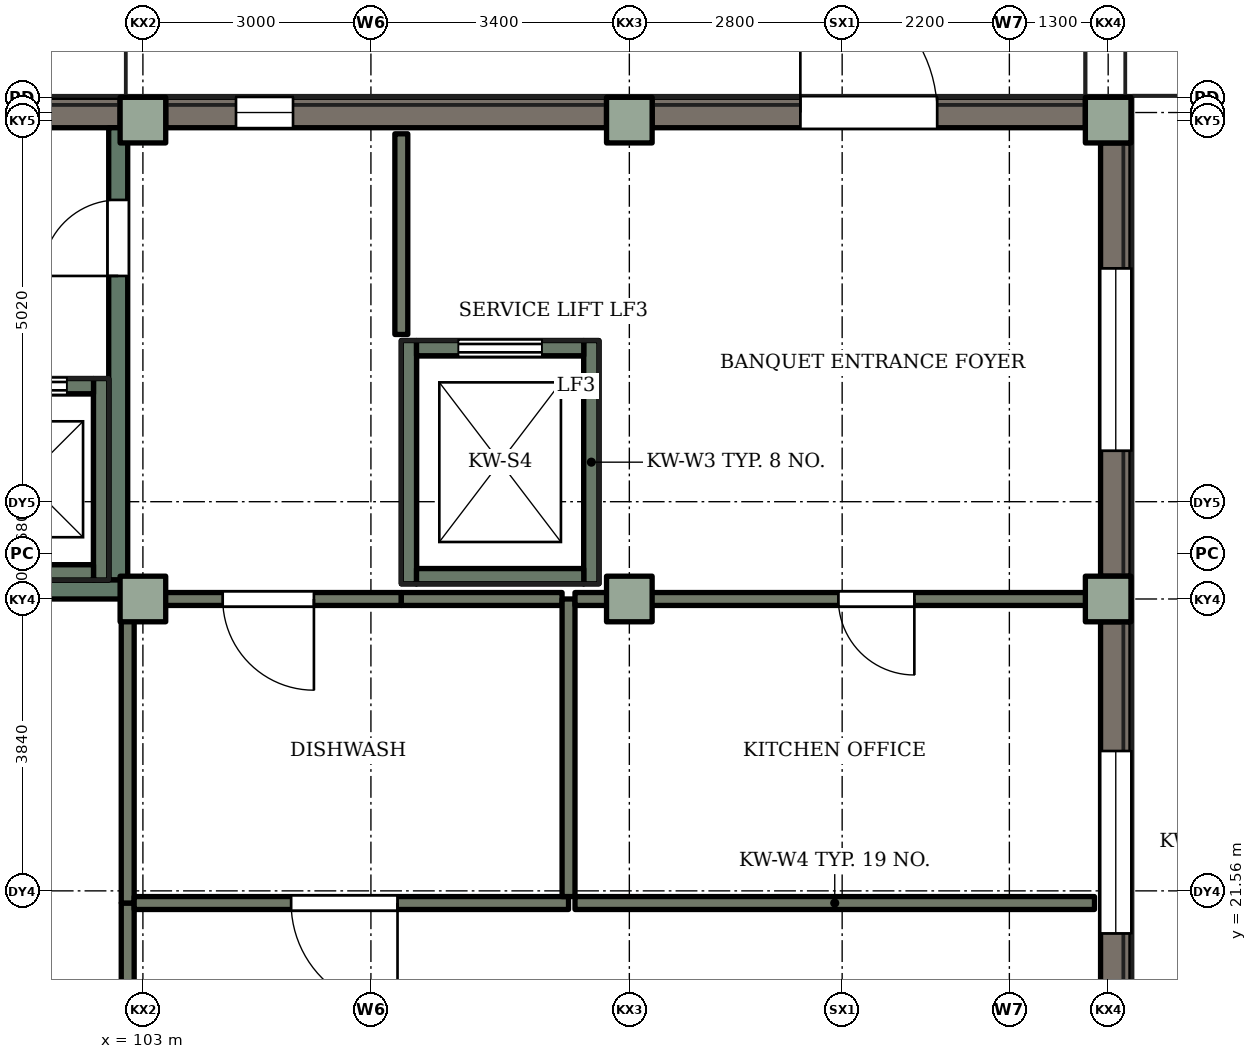
"""IFC4 building model, lengths in metres.
Left out: names, types, materials, properties, quantities, classifications, styles, units other than length and angle.
Written with IfcOpenShell. Run it as: python <this file> out.ifc"""

import sys

from ifc_helpers import new_model, si_unit, direction, frame, frame_2d, origin, origin_2d, place, context, subcontext, project, spatial, rectangle, extrude, element, fill, save


model = new_model("IFC4")
c1 = context("Model", 3, precision=1e-05, world=origin(), true_north=direction((0.0, 1.0)))
c2 = subcontext(c1, "Body", "Model", "MODEL_VIEW")
j1 = project(units=[si_unit("LENGTHUNIT", "METRE"), si_unit("PLANEANGLEUNIT", "RADIAN")], contexts=[c1])
p1 = place(None, origin())
s1 = spatial("IfcSite", under=j1, at=p1, CompositionType="ELEMENT")
p2 = place(p1, origin())
s2 = spatial("IfcBuilding", under=s1, at=p2, CompositionType="ELEMENT")
p3 = place(p2, origin())
s3 = spatial("IfcBuildingStorey", under=s2, at=p3, CompositionType="ELEMENT", Elevation=0.0)
for number, where, z_axis, x_axis in (
    (1, (103.0, 25.4, 0.0), (0.0, 0.0, 1.0), (1.0, 0.0, 0.0)),
    (2, (103.0, 31.7, 0.0), (0.0, 0.0, 1.0), (1.0, 0.0, 0.0)),
    (3, (109.4, 25.4, 0.0), (0.0, 0.0, 1.0), (1.0, 0.0, 0.0)),
    (4, (109.4, 31.7, 0.0), (0.0, 0.0, 1.0), (1.0, 0.0, 0.0)),
    (5, (115.7, 25.4, 0.0), (0.0, 0.0, 1.0), (1.0, 0.0, 0.0)),
    (6, (115.7, 31.7, 0.0), (0.0, 0.0, 1.0), (1.0, 0.0, 0.0)),
):
    element("IfcColumn", number, at=place(p3, frame(where, z_axis=z_axis, x_axis=x_axis)), inside=s3, PredefinedType="COLUMN", context=c2, shape_type="SweptSolid", body=[
        extrude(rectangle(XDim=0.6, YDim=0.6, at=origin_2d()), origin(), (0.0, 0.0, 1.0), 4.2),
    ])
p4 = place(p3, frame((97.0, 31.8, 0.0), z_axis=(0.0, 0.0, 1.0), x_axis=(1.0, 0.0, 0.0)))
e7 = element("IfcWall", 7, at=p4, inside=s3, PredefinedType="SOLIDWALL", context=c2, shape_type="SweptSolid", body=[
    extrude(rectangle(XDim=5.7, YDim=0.4, at=frame_2d((2.85, 0.0))), origin(), (0.0, 0.0, 1.0), 4.2),
])
p5 = place(p4, frame((1.5, 0.0, 0.0)))
e8 = element("IfcOpeningElement", 8, at=p5, cuts=e7, PredefinedType="OPENING", context=c2, shape_type="SweptSolid", body=[
    extrude(rectangle(XDim=1.0, YDim=2.4, at=frame_2d((0.5, 1.2))), frame((0.0, 0.21, 0.0), z_axis=(0.0, -1.0, 0.0), x_axis=(1.0, 0.0, 0.0)), (0.0, 0.0, 1.0), 0.42),
])
p6 = place(p3, frame((103.3, 31.8, 0.0), z_axis=(0.0, 0.0, 1.0), x_axis=(1.0, 0.0, 0.0)))
e9 = element("IfcWall", 9, at=p6, inside=s3, PredefinedType="SOLIDWALL", context=c2, shape_type="SweptSolid", body=[
    extrude(rectangle(XDim=5.8, YDim=0.4, at=frame_2d((2.9, 0.0))), origin(), (0.0, 0.0, 1.0), 4.2),
])
p7 = place(p6, frame((0.925, 0.0, 1.5)))
e10 = element("IfcOpeningElement", 10, at=p7, cuts=e9, PredefinedType="OPENING", context=c2, shape_type="SweptSolid", body=[
    extrude(rectangle(XDim=0.75, YDim=1.2, at=frame_2d((0.375, 0.6))), frame((0.0, 0.21, 0.0), z_axis=(0.0, -1.0, 0.0), x_axis=(1.0, 0.0, 0.0)), (0.0, 0.0, 1.0), 0.42),
])
p8 = place(p3, frame((109.7, 31.8, 0.0), z_axis=(0.0, 0.0, 1.0), x_axis=(1.0, 0.0, 0.0)))
e11 = element("IfcWall", 11, at=p8, inside=s3, PredefinedType="SOLIDWALL", context=c2, shape_type="SweptSolid", body=[
    extrude(rectangle(XDim=5.7, YDim=0.4, at=frame_2d((2.85, 0.0))), origin(), (0.0, 0.0, 1.0), 4.2),
])
p9 = place(p8, frame((1.95, 0.0, 0.0)))
e12 = element("IfcOpeningElement", 12, at=p9, cuts=e11, PredefinedType="OPENING", context=c2, shape_type="SweptSolid", body=[
    extrude(rectangle(XDim=1.8, YDim=2.4, at=frame_2d((0.9, 1.2))), frame((0.0, 0.21, 0.0), z_axis=(0.0, -1.0, 0.0), x_axis=(1.0, 0.0, 0.0)), (0.0, 0.0, 1.0), 0.42),
])
p10 = place(p3, frame((115.8, 25.1, 0.0), z_axis=(0.0, 0.0, 1.0), x_axis=(0.0, -1.0, 0.0)))
e13 = element("IfcWall", 13, at=p10, inside=s3, PredefinedType="SOLIDWALL", context=c2, shape_type="SweptSolid", body=[
    extrude(rectangle(XDim=5.8, YDim=0.4, at=frame_2d((2.9, 0.0))), origin(), (0.0, 0.0, 1.0), 4.2),
])
p11 = place(p10, frame((1.7, 0.0, 1.5)))
e14 = element("IfcOpeningElement", 14, at=p11, cuts=e13, PredefinedType="OPENING", context=c2, shape_type="SweptSolid", body=[
    extrude(rectangle(XDim=2.4, YDim=1.2, at=frame_2d((1.2, 0.6))), frame((0.0, 0.21, 0.0), z_axis=(0.0, -1.0, 0.0), x_axis=(1.0, 0.0, 0.0)), (0.0, 0.0, 1.0), 0.42),
])
p12 = place(p3, frame((115.8, 31.4, 0.0), z_axis=(0.0, 0.0, 1.0), x_axis=(0.0, -1.0, 0.0)))
e15 = element("IfcWall", 15, at=p12, inside=s3, PredefinedType="SOLIDWALL", context=c2, shape_type="SweptSolid", body=[
    extrude(rectangle(XDim=5.7, YDim=0.4, at=frame_2d((2.85, 0.0))), origin(), (0.0, 0.0, 1.0), 4.2),
])
p13 = place(p12, frame((1.65, 0.0, 1.0)))
e16 = element("IfcOpeningElement", 16, at=p13, cuts=e15, PredefinedType="OPENING", context=c2, shape_type="SweptSolid", body=[
    extrude(rectangle(XDim=2.4, YDim=1.8, at=frame_2d((1.2, 0.9))), frame((0.0, 0.21, 0.0), z_axis=(0.0, -1.0, 0.0), x_axis=(1.0, 0.0, 0.0)), (0.0, 0.0, 1.0), 0.42),
])
p14 = place(p3, frame((102.675, 25.65, 0.0), z_axis=(0.0, 0.0, 1.0), x_axis=(0.0, 1.0, 0.0)))
e17 = element("IfcWall", 17, at=p14, inside=s3, PredefinedType="SHEAR", context=c2, shape_type="SweptSolid", body=[
    extrude(rectangle(XDim=5.95, YDim=0.25, at=frame_2d((2.975, 0.0))), origin(), (0.0, 0.0, 1.0), 4.2),
])
p15 = place(p14, frame((4.0, 0.0, 0.0)))
e18 = element("IfcOpeningElement", 18, at=p15, cuts=e17, PredefinedType="OPENING", context=c2, shape_type="SweptSolid", body=[
    extrude(rectangle(XDim=1.0, YDim=2.1, at=frame_2d((0.5, 1.05))), frame((0.0, 0.135, 0.0), z_axis=(0.0, -1.0, 0.0), x_axis=(1.0, 0.0, 0.0)), (0.0, 0.0, 1.0), 0.27),
])
p16 = place(p3, frame((96.8, 25.525, 0.0), z_axis=(0.0, 0.0, 1.0), x_axis=(1.0, 0.0, 0.0)))
e19 = element("IfcWall", 19, at=p16, inside=s3, PredefinedType="SHEAR", context=c2, shape_type="SweptSolid", body=[
    extrude(rectangle(XDim=6.0, YDim=0.25, at=frame_2d((3.0, 0.0))), origin(), (0.0, 0.0, 1.0), 4.2),
])
p17 = place(p3, frame((102.45, 25.65, 0.0), z_axis=(0.0, 0.0, 1.0), x_axis=(0.0, 1.0, 0.0)))
e20 = element("IfcWall", 20, at=p17, inside=s3, PredefinedType="SHEAR", context=c2, shape_type="SweptSolid", body=[
    extrude(rectangle(XDim=2.65, YDim=0.2, at=frame_2d((1.325, 0.0))), origin(), (0.0, 0.0, 1.0), 4.2),
])
p18 = place(p3, frame((100.55, 25.75, 0.0), z_axis=(0.0, 0.0, 1.0), x_axis=(1.0, 0.0, 0.0)))
e21 = element("IfcWall", 21, at=p18, inside=s3, PredefinedType="SHEAR", context=c2, shape_type="SweptSolid", body=[
    extrude(rectangle(XDim=1.8, YDim=0.2, at=frame_2d((0.9, 0.0))), origin(), (0.0, 0.0, 1.0), 4.2),
])
p19 = place(p3, frame((100.55, 28.2, 0.0), z_axis=(0.0, 0.0, 1.0), x_axis=(1.0, 0.0, 0.0)))
e22 = element("IfcWall", 22, at=p19, inside=s3, PredefinedType="SHEAR", context=c2, shape_type="SweptSolid", body=[
    extrude(rectangle(XDim=1.8, YDim=0.2, at=frame_2d((0.9, 0.0))), origin(), (0.0, 0.0, 1.0), 4.2),
])
p20 = place(p19, frame((0.35, 0.0, 0.0)))
e23 = element("IfcOpeningElement", 23, at=p20, cuts=e22, PredefinedType="OPENING", context=c2, shape_type="SweptSolid", body=[
    extrude(rectangle(XDim=1.1, YDim=2.1, at=frame_2d((0.55, 1.05))), frame((0.0, 0.11, 0.0), z_axis=(0.0, -1.0, 0.0), x_axis=(1.0, 0.0, 0.0)), (0.0, 0.0, 1.0), 0.22),
])
for number, where, z_axis, x_axis in (
    (24, (106.5, 25.6, 0.0), (0.0, 0.0, 1.0), (0.0, 1.0, 0.0)),
    (25, (108.9, 25.6, 0.0), (0.0, 0.0, 1.0), (0.0, 1.0, 0.0)),
):
    element("IfcWall", number, at=place(p3, frame(where, z_axis=z_axis, x_axis=x_axis)), inside=s3, PredefinedType="SHEAR", context=c2, shape_type="SweptSolid", body=[
        extrude(rectangle(XDim=3.2, YDim=0.2, at=frame_2d((1.6, 0.0))), origin(), (0.0, 0.0, 1.0), 4.2),
    ])
p21 = place(p3, frame((106.6, 25.7, 0.0), z_axis=(0.0, 0.0, 1.0), x_axis=(1.0, 0.0, 0.0)))
e26 = element("IfcWall", 26, at=p21, inside=s3, PredefinedType="SHEAR", context=c2, shape_type="SweptSolid", body=[
    extrude(rectangle(XDim=2.2, YDim=0.2, at=frame_2d((1.1, 0.0))), origin(), (0.0, 0.0, 1.0), 4.2),
])
p22 = place(p3, frame((106.6, 28.7, 0.0), z_axis=(0.0, 0.0, 1.0), x_axis=(1.0, 0.0, 0.0)))
e27 = element("IfcWall", 27, at=p22, inside=s3, PredefinedType="SHEAR", context=c2, shape_type="SweptSolid", body=[
    extrude(rectangle(XDim=2.2, YDim=0.2, at=frame_2d((1.1, 0.0))), origin(), (0.0, 0.0, 1.0), 4.2),
])
p23 = place(p22, frame((0.55, 0.0, 0.0)))
e28 = element("IfcOpeningElement", 28, at=p23, cuts=e27, PredefinedType="OPENING", context=c2, shape_type="SweptSolid", body=[
    extrude(rectangle(XDim=1.1, YDim=2.1, at=frame_2d((0.55, 1.05))), frame((0.0, 0.11, 0.0), z_axis=(0.0, -1.0, 0.0), x_axis=(1.0, 0.0, 0.0)), (0.0, 0.0, 1.0), 0.22),
])
p24 = place(p3, frame((102.45, 25.65, -1.4), z_axis=(0.0, 0.0, 1.0), x_axis=(0.0, 1.0, 0.0)))
e29 = element("IfcWall", 29, at=p24, inside=s3, PredefinedType="SHEAR", context=c2, shape_type="SweptSolid", body=[
    extrude(rectangle(XDim=2.65, YDim=0.2, at=frame_2d((1.325, 0.0))), origin(), (0.0, 0.0, 1.0), 1.4),
])
for number, where, z_axis, x_axis in (
    (30, (100.55, 25.75, -1.4), (0.0, 0.0, 1.0), (1.0, 0.0, 0.0)),
    (31, (100.55, 28.2, -1.4), (0.0, 0.0, 1.0), (1.0, 0.0, 0.0)),
):
    element("IfcWall", number, at=place(p3, frame(where, z_axis=z_axis, x_axis=x_axis)), inside=s3, PredefinedType="SHEAR", context=c2, shape_type="SweptSolid", body=[
        extrude(rectangle(XDim=1.8, YDim=0.2, at=frame_2d((0.9, 0.0))), origin(), (0.0, 0.0, 1.0), 1.4),
    ])
for number, where, z_axis, x_axis in (
    (32, (106.5, 25.6, -1.4), (0.0, 0.0, 1.0), (0.0, 1.0, 0.0)),
    (33, (108.9, 25.6, -1.4), (0.0, 0.0, 1.0), (0.0, 1.0, 0.0)),
):
    element("IfcWall", number, at=place(p3, frame(where, z_axis=z_axis, x_axis=x_axis)), inside=s3, PredefinedType="SHEAR", context=c2, shape_type="SweptSolid", body=[
        extrude(rectangle(XDim=3.2, YDim=0.2, at=frame_2d((1.6, 0.0))), origin(), (0.0, 0.0, 1.0), 1.4),
    ])
for number, where, z_axis, x_axis in (
    (34, (106.6, 25.7, -1.4), (0.0, 0.0, 1.0), (1.0, 0.0, 0.0)),
    (35, (106.6, 28.7, -1.4), (0.0, 0.0, 1.0), (1.0, 0.0, 0.0)),
):
    element("IfcWall", number, at=place(p3, frame(where, z_axis=z_axis, x_axis=x_axis)), inside=s3, PredefinedType="SHEAR", context=c2, shape_type="SweptSolid", body=[
        extrude(rectangle(XDim=2.2, YDim=0.2, at=frame_2d((1.1, 0.0))), origin(), (0.0, 0.0, 1.0), 1.4),
    ])
p25 = place(p3, frame((102.8, 12.485, 0.0), z_axis=(0.0, 0.0, 1.0), x_axis=(0.0, 1.0, 0.0)))
e36 = element("IfcWall", 36, at=p25, inside=s3, PredefinedType="PARTITIONING", context=c2, shape_type="SweptSolid", body=[
    extrude(rectangle(XDim=8.915, YDim=0.17, at=frame_2d((4.458, 0.0))), origin(), (0.0, 0.0, 1.0), 3.92),
])
p26 = place(p25, frame((3.865, 0.0, 0.0)))
e37 = element("IfcOpeningElement", 37, at=p26, cuts=e36, PredefinedType="OPENING", context=c2, shape_type="SweptSolid", body=[
    extrude(rectangle(XDim=1.2, YDim=2.1, at=frame_2d((0.6, 1.05))), frame((0.0, 0.095, 0.0), z_axis=(0.0, -1.0, 0.0), x_axis=(1.0, 0.0, 0.0)), (0.0, 0.0, 1.0), 0.19),
])
p27 = place(p3, frame((102.8, 21.4, 0.0), z_axis=(0.0, 0.0, 1.0), x_axis=(0.0, 1.0, 0.0)))
e38 = element("IfcWall", 38, at=p27, inside=s3, PredefinedType="PARTITIONING", context=c2, shape_type="SweptSolid", body=[
    extrude(rectangle(XDim=3.92, YDim=0.17, at=frame_2d((1.96, 0.0))), origin(), (0.0, 0.0, 1.0), 3.92),
])
p28 = place(p3, frame((103.22, 31.6, 0.0), z_axis=(0.0, 0.0, 1.0), x_axis=(-1.0, 0.0, 0.0)))
e39 = element("IfcWall", 39, at=p28, inside=s3, PredefinedType="PARTITIONING", context=c2, shape_type="SweptSolid", body=[
    extrude(rectangle(XDim=0.34, YDim=0.17, at=frame_2d((0.17, 0.0))), origin(), (0.0, 0.0, 1.0), 3.92),
])
p29 = place(p3, frame((106.4, 25.4, 0.0), z_axis=(0.0, 0.0, 1.0), x_axis=(-1.0, 0.0, 0.0)))
e40 = element("IfcWall", 40, at=p29, inside=s3, PredefinedType="PARTITIONING", context=c2, shape_type="SweptSolid", body=[
    extrude(rectangle(XDim=3.52, YDim=0.17, at=frame_2d((1.76, 0.0))), origin(), (0.0, 0.0, 1.0), 3.92),
])
p30 = place(p29, frame((1.15, 0.0, 0.0)))
e41 = element("IfcOpeningElement", 41, at=p30, cuts=e40, PredefinedType="OPENING", context=c2, shape_type="SweptSolid", body=[
    extrude(rectangle(XDim=1.2, YDim=2.1, at=frame_2d((0.6, 1.05))), frame((0.0, 0.095, 0.0), z_axis=(0.0, -1.0, 0.0), x_axis=(1.0, 0.0, 0.0)), (0.0, 0.0, 1.0), 0.19),
])
p31 = place(p3, frame((106.4, 28.88, 0.0), z_axis=(0.0, 0.0, 1.0), x_axis=(0.0, 1.0, 0.0)))
e42 = element("IfcWall", 42, at=p31, inside=s3, PredefinedType="PARTITIONING", context=c2, shape_type="SweptSolid", body=[
    extrude(rectangle(XDim=2.64, YDim=0.17, at=frame_2d((1.32, 0.0))), origin(), (0.0, 0.0, 1.0), 3.92),
])
p32 = place(p3, frame((108.515, 25.4, 0.0), z_axis=(0.0, 0.0, 1.0), x_axis=(-1.0, 0.0, 0.0)))
e43 = element("IfcWall", 43, at=p32, inside=s3, PredefinedType="PARTITIONING", context=c2, shape_type="SweptSolid", body=[
    extrude(rectangle(XDim=2.115, YDim=0.17, at=frame_2d((1.058, 0.0))), origin(), (0.0, 0.0, 1.0), 3.92),
])
p33 = place(p3, frame((108.6, 21.4, 0.0), z_axis=(0.0, 0.0, 1.0), x_axis=(-1.0, 0.0, 0.0)))
e44 = element("IfcWall", 44, at=p33, inside=s3, PredefinedType="PARTITIONING", context=c2, shape_type="SweptSolid", body=[
    extrude(rectangle(XDim=5.715, YDim=0.17, at=frame_2d((2.857, 0.0))), origin(), (0.0, 0.0, 1.0), 3.92),
])
p34 = place(p33, frame((2.25, 0.0, 0.0)))
e45 = element("IfcOpeningElement", 45, at=p34, cuts=e44, PredefinedType="OPENING", context=c2, shape_type="SweptSolid", body=[
    extrude(rectangle(XDim=1.4, YDim=2.1, at=frame_2d((0.7, 1.05))), frame((0.0, 0.095, 0.0), z_axis=(0.0, -1.0, 0.0), x_axis=(1.0, 0.0, 0.0)), (0.0, 0.0, 1.0), 0.19),
])
p35 = place(p3, frame((108.6, 21.485, 0.0), z_axis=(0.0, 0.0, 1.0), x_axis=(0.0, 1.0, 0.0)))
e46 = element("IfcWall", 46, at=p35, inside=s3, PredefinedType="PARTITIONING", context=c2, shape_type="SweptSolid", body=[
    extrude(rectangle(XDim=3.915, YDim=0.17, at=frame_2d((1.958, 0.0))), origin(), (0.0, 0.0, 1.0), 3.92),
])
p36 = place(p3, frame((109.58, 25.4, 0.0), z_axis=(0.0, 0.0, 1.0), x_axis=(-1.0, 0.0, 0.0)))
e47 = element("IfcWall", 47, at=p36, inside=s3, PredefinedType="PARTITIONING", context=c2, shape_type="SweptSolid", body=[
    extrude(rectangle(XDim=0.895, YDim=0.17, at=frame_2d((0.448, 0.0))), origin(), (0.0, 0.0, 1.0), 3.92),
])
p37 = place(p3, frame((109.58, 31.6, 0.0), z_axis=(0.0, 0.0, 1.0), x_axis=(-1.0, 0.0, 0.0)))
e48 = element("IfcWall", 48, at=p37, inside=s3, PredefinedType="PARTITIONING", context=c2, shape_type="SweptSolid", body=[
    extrude(rectangle(XDim=0.4, YDim=0.17, at=frame_2d((0.2, 0.0))), origin(), (0.0, 0.0, 1.0), 3.92),
])
p38 = place(p3, frame((115.52, 21.4, 0.0), z_axis=(0.0, 0.0, 1.0), x_axis=(-1.0, 0.0, 0.0)))
e49 = element("IfcWall", 49, at=p38, inside=s3, PredefinedType="PARTITIONING", context=c2, shape_type="SweptSolid", body=[
    extrude(rectangle(XDim=6.835, YDim=0.17, at=frame_2d((3.417, 0.0))), origin(), (0.0, 0.0, 1.0), 3.92),
])
p39 = place(p3, frame((115.6, 25.4, 0.0), z_axis=(0.0, 0.0, 1.0), x_axis=(-1.0, 0.0, 0.0)))
e50 = element("IfcWall", 50, at=p39, inside=s3, PredefinedType="PARTITIONING", context=c2, shape_type="SweptSolid", body=[
    extrude(rectangle(XDim=5.98, YDim=0.17, at=frame_2d((2.99, 0.0))), origin(), (0.0, 0.0, 1.0), 3.92),
])
p40 = place(p39, frame((2.45, 0.0, 0.0)))
e51 = element("IfcOpeningElement", 51, at=p40, cuts=e50, PredefinedType="OPENING", context=c2, shape_type="SweptSolid", body=[
    extrude(rectangle(XDim=1.0, YDim=2.1, at=frame_2d((0.5, 1.05))), frame((0.0, 0.095, 0.0), z_axis=(0.0, -1.0, 0.0), x_axis=(1.0, 0.0, 0.0)), (0.0, 0.0, 1.0), 0.19),
])
p41 = place(p9, origin())
e52 = element("IfcDoor", 52, at=p41, inside=s3, OperationType="DOUBLE_DOOR_SINGLE_SWING", PredefinedType="DOOR", context=c2, shape_type="SweptSolid", body=[
    extrude(rectangle(XDim=1.8, YDim=2.4, at=frame_2d((0.9, 1.2))), frame((0.0, 0.025, 0.0), z_axis=(0.0, -1.0, 0.0), x_axis=(1.0, 0.0, 0.0)), (0.0, 0.0, 1.0), 0.05),
])
fill(e12, e52)
p42 = place(p11, origin())
e53 = element("IfcWindow", 53, at=p42, inside=s3, PartitioningType="SINGLE_PANEL", PredefinedType="WINDOW", context=c2, shape_type="SweptSolid", body=[
    extrude(rectangle(XDim=2.4, YDim=1.2, at=frame_2d((1.2, 0.6))), frame((0.0, 0.03, 0.0), z_axis=(0.0, -1.0, 0.0), x_axis=(1.0, 0.0, 0.0)), (0.0, 0.0, 1.0), 0.06),
])
fill(e14, e53)
p43 = place(p13, origin())
e54 = element("IfcWindow", 54, at=p43, inside=s3, PartitioningType="SINGLE_PANEL", PredefinedType="WINDOW", context=c2, shape_type="SweptSolid", body=[
    extrude(rectangle(XDim=2.4, YDim=1.8, at=frame_2d((1.2, 0.9))), frame((0.0, 0.03, 0.0), z_axis=(0.0, -1.0, 0.0), x_axis=(1.0, 0.0, 0.0)), (0.0, 0.0, 1.0), 0.06),
])
fill(e16, e54)
p44 = place(p7, origin())
e55 = element("IfcWindow", 55, at=p44, inside=s3, PartitioningType="SINGLE_PANEL", PredefinedType="WINDOW", context=c2, shape_type="SweptSolid", body=[
    extrude(rectangle(XDim=0.75, YDim=1.2, at=frame_2d((0.375, 0.6))), frame((0.0, 0.03, 0.0), z_axis=(0.0, -1.0, 0.0), x_axis=(1.0, 0.0, 0.0)), (0.0, 0.0, 1.0), 0.06),
])
fill(e10, e55)
p45 = place(p20, origin())
e56 = element("IfcDoor", 56, at=p45, inside=s3, OperationType="SLIDING_TO_LEFT", PredefinedType="DOOR", context=c2, shape_type="SweptSolid", body=[
    extrude(rectangle(XDim=1.1, YDim=2.1, at=frame_2d((0.55, 1.05))), frame((0.0, 0.025, 0.0), z_axis=(0.0, -1.0, 0.0), x_axis=(1.0, 0.0, 0.0)), (0.0, 0.0, 1.0), 0.05),
])
fill(e23, e56)
p46 = place(p23, origin())
e57 = element("IfcDoor", 57, at=p46, inside=s3, OperationType="SLIDING_TO_LEFT", PredefinedType="DOOR", context=c2, shape_type="SweptSolid", body=[
    extrude(rectangle(XDim=1.1, YDim=2.1, at=frame_2d((0.55, 1.05))), frame((0.0, 0.025, 0.0), z_axis=(0.0, -1.0, 0.0), x_axis=(1.0, 0.0, 0.0)), (0.0, 0.0, 1.0), 0.05),
])
fill(e28, e57)
p47 = place(p34, origin())
e58 = element("IfcDoor", 58, at=p47, inside=s3, OperationType="DOUBLE_DOOR_SINGLE_SWING", PredefinedType="DOOR", context=c2, shape_type="SweptSolid", body=[
    extrude(rectangle(XDim=1.4, YDim=2.1, at=frame_2d((0.7, 1.05))), frame((0.0, 0.025, 0.0), z_axis=(0.0, -1.0, 0.0), x_axis=(1.0, 0.0, 0.0)), (0.0, 0.0, 1.0), 0.05),
])
fill(e45, e58)
p48 = place(p40, origin())
e59 = element("IfcDoor", 59, at=p48, inside=s3, OperationType="SINGLE_SWING_LEFT", PredefinedType="DOOR", context=c2, shape_type="SweptSolid", body=[
    extrude(rectangle(XDim=1.0, YDim=2.1, at=frame_2d((0.5, 1.05))), frame((0.0, 0.025, 0.0), z_axis=(0.0, -1.0, 0.0), x_axis=(1.0, 0.0, 0.0)), (0.0, 0.0, 1.0), 0.05),
])
fill(e51, e59)
p49 = place(p15, origin())
e60 = element("IfcDoor", 60, at=p49, inside=s3, OperationType="SINGLE_SWING_LEFT", PredefinedType="DOOR", context=c2, shape_type="SweptSolid", body=[
    extrude(rectangle(XDim=1.0, YDim=2.1, at=frame_2d((0.5, 1.05))), frame((0.0, 0.025, 0.0), z_axis=(0.0, -1.0, 0.0), x_axis=(1.0, 0.0, 0.0)), (0.0, 0.0, 1.0), 0.05),
])
fill(e18, e60)
p50 = place(p30, origin())
e61 = element("IfcDoor", 61, at=p50, inside=s3, OperationType="SINGLE_SWING_LEFT", PredefinedType="DOOR", context=c2, shape_type="SweptSolid", body=[
    extrude(rectangle(XDim=1.2, YDim=2.1, at=frame_2d((0.6, 1.05))), frame((0.0, 0.025, 0.0), z_axis=(0.0, -1.0, 0.0), x_axis=(1.0, 0.0, 0.0)), (0.0, 0.0, 1.0), 0.05),
])
fill(e41, e61)
save(model, sys.argv[1])
